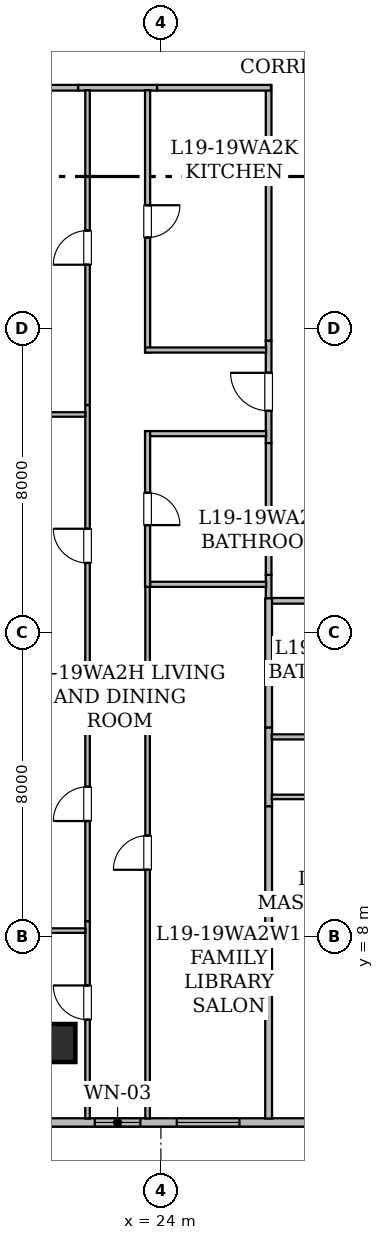
"""IFC4 building model, lengths in metres.
Left out: names, types, materials, properties, quantities, classifications, styles, units other than length and angle.
Written with IfcOpenShell. Run it as: python <this file> out.ifc"""

import sys

from ifc_helpers import new_model, si_unit, direction, frame, frame_2d, origin, origin_2d, place, context, subcontext, project, spatial, rectangle, hollow_rectangle, extrude, element, fill, save


model = new_model("IFC4")
c1 = context("Model", 3, precision=1e-05, world=origin(), true_north=direction((0.0, 1.0)))
c2 = subcontext(c1, "Body", "Model", "MODEL_VIEW")
j1 = project(units=[si_unit("LENGTHUNIT", "METRE"), si_unit("PLANEANGLEUNIT", "RADIAN")], contexts=[c1])
p1 = place(None, origin())
s1 = spatial("IfcSite", under=j1, at=p1, CompositionType="ELEMENT")
p2 = place(p1, origin())
s2 = spatial("IfcBuilding", under=s1, at=p2, CompositionType="ELEMENT")
p3 = place(p2, frame((0.0, 0.0, 77.1)))
s3 = spatial("IfcBuildingStorey", under=s2, at=p3, CompositionType="ELEMENT", Elevation=77.1)
p4 = place(p3, frame((21.25, 5.2, 0.0), z_axis=(0.0, 0.0, 1.0), x_axis=(1.0, 0.0, 0.0)))
e1 = element("IfcColumn", 1, at=p4, inside=s3, PredefinedType="COLUMN", context=c2, shape_type="SweptSolid", body=[
    extrude(hollow_rectangle(XDim=1.0, YDim=1.0, WallThickness=0.05, at=origin_2d()), origin(), (0.0, 0.0, 1.0), 3.65),
])
p5 = place(p3, frame((45.683, 3.11, 0.0), z_axis=(0.0, 0.0, 1.0), x_axis=(-1.0, 0.0, 0.0)))
e2 = element("IfcWall", 2, at=p5, inside=s3, PredefinedType="STANDARD", context=c2, shape_type="SweptSolid", body=[
    extrude(rectangle(XDim=37.368, YDim=0.22, at=frame_2d((18.684, 0.0))), origin(), (0.0, 0.0, 1.0), 3.43),
])
p6 = place(p5, frame((31.194, 0.0, 0.85)))
e3 = element("IfcOpeningElement", 3, at=p6, cuts=e2, PredefinedType="OPENING", context=c2, shape_type="SweptSolid", body=[
    extrude(rectangle(XDim=1.65, YDim=1.55, at=frame_2d((0.825, 0.775))), frame((0.0, 0.12, 0.0), z_axis=(0.0, -1.0, 0.0), x_axis=(1.0, 0.0, 0.0)), (0.0, 0.0, 1.0), 0.24),
])
p7 = place(p5, frame((19.615, 0.0, 0.85)))
e4 = element("IfcOpeningElement", 4, at=p7, cuts=e2, PredefinedType="OPENING", context=c2, shape_type="SweptSolid", body=[
    extrude(rectangle(XDim=1.65, YDim=1.55, at=frame_2d((0.825, 0.775))), frame((0.0, 0.12, 0.0), z_axis=(0.0, -1.0, 0.0), x_axis=(1.0, 0.0, 0.0)), (0.0, 0.0, 1.0), 0.24),
])
p8 = place(p5, frame((22.223, 0.0, 0.8)))
e5 = element("IfcOpeningElement", 5, at=p8, cuts=e2, PredefinedType="OPENING", context=c2, shape_type="SweptSolid", body=[
    extrude(rectangle(XDim=1.2, YDim=1.5, at=frame_2d((0.6, 0.75))), frame((0.0, 0.12, 0.0), z_axis=(0.0, -1.0, 0.0), x_axis=(1.0, 0.0, 0.0)), (0.0, 0.0, 1.0), 0.24),
])
p9 = place(p5, frame((25.65, 0.0, 0.85)))
e6 = element("IfcOpeningElement", 6, at=p9, cuts=e2, PredefinedType="OPENING", context=c2, shape_type="SweptSolid", body=[
    extrude(rectangle(XDim=1.65, YDim=1.55, at=frame_2d((0.825, 0.775))), frame((0.0, 0.12, 0.0), z_axis=(0.0, -1.0, 0.0), x_axis=(1.0, 0.0, 0.0)), (0.0, 0.0, 1.0), 0.24),
])
p10 = place(p5, frame((10.983, 0.0, 0.8)))
e7 = element("IfcOpeningElement", 7, at=p10, cuts=e2, PredefinedType="OPENING", context=c2, shape_type="SweptSolid", body=[
    extrude(rectangle(XDim=1.2, YDim=1.5, at=frame_2d((0.6, 0.75))), frame((0.0, 0.12, 0.0), z_axis=(0.0, -1.0, 0.0), x_axis=(1.0, 0.0, 0.0)), (0.0, 0.0, 1.0), 0.24),
])
p11 = place(p5, frame((14.783, 0.0, 0.85)))
e8 = element("IfcOpeningElement", 8, at=p11, cuts=e2, PredefinedType="OPENING", context=c2, shape_type="SweptSolid", body=[
    extrude(rectangle(XDim=1.65, YDim=1.55, at=frame_2d((0.825, 0.775))), frame((0.0, 0.12, 0.0), z_axis=(0.0, -1.0, 0.0), x_axis=(1.0, 0.0, 0.0)), (0.0, 0.0, 1.0), 0.24),
])
p12 = place(p5, frame((6.733, 0.0, 0.85)))
e9 = element("IfcOpeningElement", 9, at=p12, cuts=e2, PredefinedType="OPENING", context=c2, shape_type="SweptSolid", body=[
    extrude(rectangle(XDim=1.65, YDim=1.55, at=frame_2d((0.825, 0.775))), frame((0.0, 0.12, 0.0), z_axis=(0.0, -1.0, 0.0), x_axis=(1.0, 0.0, 0.0)), (0.0, 0.0, 1.0), 0.24),
])
p13 = place(p5, frame((2.228, 0.0, 0.85)))
e10 = element("IfcOpeningElement", 10, at=p13, cuts=e2, PredefinedType="OPENING", context=c2, shape_type="SweptSolid", body=[
    extrude(rectangle(XDim=1.65, YDim=1.55, at=frame_2d((0.825, 0.775))), frame((0.0, 0.12, 0.0), z_axis=(0.0, -1.0, 0.0), x_axis=(1.0, 0.0, 0.0)), (0.0, 0.0, 1.0), 0.24),
])
p14 = place(p5, frame((0.187, 0.0, 0.8)))
e11 = element("IfcOpeningElement", 11, at=p14, cuts=e2, PredefinedType="OPENING", context=c2, shape_type="SweptSolid", body=[
    extrude(rectangle(XDim=1.2, YDim=1.5, at=frame_2d((0.6, 0.75))), frame((0.0, 0.12, 0.0), z_axis=(0.0, -1.0, 0.0), x_axis=(1.0, 0.0, 0.0)), (0.0, 0.0, 1.0), 0.24),
])
p15 = place(p3, frame((26.835, 16.9, 0.0), z_axis=(0.0, 0.0, 1.0), x_axis=(0.0, 1.0, 0.0)))
e12 = element("IfcWall", 12, at=p15, inside=s3, PredefinedType="STANDARD", context=c2, shape_type="SweptSolid", body=[
    extrude(rectangle(XDim=0.618, YDim=0.15, at=frame_2d((0.309, 0.0))), origin(), (0.0, 0.0, 1.0), 3.43),
])
p16 = place(p3, frame((26.835, 20.985, 0.0), z_axis=(0.0, 0.0, 1.0), x_axis=(0.0, 1.0, 0.0)))
e13 = element("IfcWall", 13, at=p16, inside=s3, PredefinedType="STANDARD", context=c2, shape_type="SweptSolid", body=[
    extrude(rectangle(XDim=2.698, YDim=0.15, at=frame_2d((1.349, 0.0))), origin(), (0.0, 0.0, 1.0), 3.43),
])
p17 = place(p16, frame((0.849, 0.0, 0.0)))
e14 = element("IfcOpeningElement", 14, at=p17, cuts=e13, PredefinedType="OPENING", context=c2, shape_type="SweptSolid", body=[
    extrude(rectangle(XDim=1.0, YDim=2.15, at=frame_2d((0.5, 1.075))), frame((0.0, 0.085, 0.0), z_axis=(0.0, -1.0, 0.0), x_axis=(1.0, 0.0, 0.0)), (0.0, 0.0, 1.0), 0.17),
])
p18 = place(p3, frame((23.9, 30.335, 0.0), z_axis=(0.0, 0.0, 1.0), x_axis=(-1.0, 0.0, 0.0)))
e15 = element("IfcWall", 15, at=p18, inside=s3, PredefinedType="STANDARD", context=c2, shape_type="SweptSolid", body=[
    extrude(rectangle(XDim=2.079, YDim=0.15, at=frame_2d((1.04, 0.0))), origin(), (0.0, 0.0, 1.0), 3.43),
])
p19 = place(p3, frame((26.835, 17.518, 0.0), z_axis=(0.0, 0.0, 1.0), x_axis=(0.0, 1.0, 0.0)))
e16 = element("IfcWall", 16, at=p19, inside=s3, PredefinedType="STANDARD", context=c2, shape_type="SweptSolid", body=[
    extrude(rectangle(XDim=3.467, YDim=0.15, at=frame_2d((1.733, 0.0))), origin(), (0.0, 0.0, 1.0), 2.647),
])
p20 = place(p3, frame((26.835, 23.683, 0.0), z_axis=(0.0, 0.0, 1.0), x_axis=(0.0, 1.0, 0.0)))
e17 = element("IfcWall", 17, at=p20, inside=s3, PredefinedType="STANDARD", context=c2, shape_type="SweptSolid", body=[
    extrude(rectangle(XDim=6.717, YDim=0.15, at=frame_2d((3.358, 0.0))), origin(), (0.0, 0.0, 1.0), 2.961),
])
p21 = place(p3, frame((26.898, 30.335, 0.0), z_axis=(0.0, 0.0, 1.0), x_axis=(-1.0, 0.0, 0.0)))
e18 = element("IfcWall", 18, at=p21, inside=s3, PredefinedType="STANDARD", context=c2, shape_type="SweptSolid", body=[
    extrude(rectangle(XDim=2.998, YDim=0.15, at=frame_2d((1.499, 0.0))), origin(), (0.0, 0.0, 1.0), 3.43),
])
p22 = place(p3, frame((21.821, 30.335, 0.0), z_axis=(0.0, 0.0, 1.0), x_axis=(-1.0, 0.0, 0.0)))
e19 = element("IfcWall", 19, at=p22, inside=s3, PredefinedType="STANDARD", context=c2, shape_type="SweptSolid", body=[
    extrude(rectangle(XDim=5.225, YDim=0.15, at=frame_2d((2.613, 0.0))), origin(), (0.0, 0.0, 1.0), 2.647),
])
p23 = place(p3, frame((31.601, 16.835, 0.0), z_axis=(0.0, 0.0, 1.0), x_axis=(-1.0, 0.0, 0.0)))
e20 = element("IfcWall", 20, at=p23, inside=s3, PredefinedType="STANDARD", context=c2, shape_type="SweptSolid", body=[
    extrude(rectangle(XDim=4.701, YDim=0.15, at=frame_2d((2.351, 0.0))), origin(), (0.0, 0.0, 1.0), 2.647),
])
p24 = place(p3, frame((23.65, 3.212, 0.0), z_axis=(0.0, 0.0, 1.0), x_axis=(0.0, 1.0, 0.0)))
e21 = element("IfcWall", 21, at=p24, inside=s3, PredefinedType="PARTITIONING", context=c2, shape_type="SweptSolid", body=[
    extrude(rectangle(XDim=13.992, YDim=0.12, at=frame_2d((6.996, 0.0))), origin(), (0.0, 0.0, 1.0), 2.803),
])
p25 = place(p24, frame((6.546, 0.0, 0.0)))
e22 = element("IfcOpeningElement", 22, at=p25, cuts=e21, PredefinedType="OPENING", context=c2, shape_type="SweptSolid", body=[
    extrude(rectangle(XDim=0.9, YDim=2.1, at=frame_2d((0.45, 1.05))), frame((0.0, 0.07, 0.0), z_axis=(0.0, -1.0, 0.0), x_axis=(1.0, 0.0, 0.0)), (0.0, 0.0, 1.0), 0.14),
])
p26 = place(p3, frame((23.715, 17.269, 0.0), z_axis=(0.0, 0.0, 1.0), x_axis=(1.0, 0.0, 0.0)))
e23 = element("IfcWall", 23, at=p26, inside=s3, PredefinedType="PARTITIONING", context=c2, shape_type="SweptSolid", body=[
    extrude(rectangle(XDim=3.055, YDim=0.135, at=frame_2d((1.527, 0.0))), origin(), (0.0, 0.0, 1.0), 3.43),
])
p27 = place(p3, frame((26.835, 13.504, 0.0), z_axis=(0.0, 0.0, 1.0), x_axis=(0.0, -1.0, 0.0)))
e24 = element("IfcWall", 24, at=p27, inside=s3, PredefinedType="STANDARD", context=c2, shape_type="SweptSolid", body=[
    extrude(rectangle(XDim=2.078, YDim=0.18, at=frame_2d((1.039, 0.0))), origin(), (0.0, 0.0, 1.0), 3.43),
])
p28 = place(p3, frame((26.835, 16.9, 0.0), z_axis=(0.0, 0.0, 1.0), x_axis=(0.0, -1.0, 0.0)))
e25 = element("IfcWall", 25, at=p28, inside=s3, PredefinedType="STANDARD", context=c2, shape_type="SweptSolid", body=[
    extrude(rectangle(XDim=3.396, YDim=0.18, at=frame_2d((1.698, 0.0))), origin(), (0.0, 0.0, 1.0), 3.43),
])
p29 = place(p3, frame((26.835, 11.426, 0.0), z_axis=(0.0, 0.0, 1.0), x_axis=(0.0, -1.0, 0.0)))
e26 = element("IfcWall", 26, at=p29, inside=s3, PredefinedType="STANDARD", context=c2, shape_type="SweptSolid", body=[
    extrude(rectangle(XDim=8.214, YDim=0.18, at=frame_2d((4.107, 0.0))), origin(), (0.0, 0.0, 1.0), 2.803),
])
p30 = place(p3, frame((26.77, 21.234, 0.0), z_axis=(0.0, 0.0, 1.0), x_axis=(-1.0, 0.0, 0.0)))
e27 = element("IfcWall", 27, at=p30, inside=s3, PredefinedType="PARTITIONING", context=c2, shape_type="SweptSolid", body=[
    extrude(rectangle(XDim=3.185, YDim=0.135, at=frame_2d((1.593, 0.0))), origin(), (0.0, 0.0, 1.0), 3.43),
])
p31 = place(p3, frame((23.65, 21.299, 0.0), z_axis=(0.0, 0.0, 1.0), x_axis=(0.0, -1.0, 0.0)))
e28 = element("IfcWall", 28, at=p31, inside=s3, PredefinedType="PARTITIONING", context=c2, shape_type="SweptSolid", body=[
    extrude(rectangle(XDim=4.095, YDim=0.135, at=frame_2d((2.047, 0.0))), origin(), (0.0, 0.0, 1.0), 2.647),
])
p32 = place(p31, frame((1.622, 0.0, 0.0)))
e29 = element("IfcOpeningElement", 29, at=p32, cuts=e28, PredefinedType="OPENING", context=c2, shape_type="SweptSolid", body=[
    extrude(rectangle(XDim=0.85, YDim=2.1, at=frame_2d((0.425, 1.05))), frame((0.0, 0.077, 0.0), z_axis=(0.0, -1.0, 0.0), x_axis=(1.0, 0.0, 0.0)), (0.0, 0.0, 1.0), 0.155),
])
p33 = place(p3, frame((23.65, 30.27, 0.0), z_axis=(0.0, 0.0, 1.0), x_axis=(0.0, -1.0, 0.0)))
e30 = element("IfcWall", 30, at=p33, inside=s3, PredefinedType="PARTITIONING", context=c2, shape_type="SweptSolid", body=[
    extrude(rectangle(XDim=6.901, YDim=0.135, at=frame_2d((3.451, 0.0))), origin(), (0.0, 0.0, 1.0), 2.961),
])
p34 = place(p33, frame((3.026, 0.0, 0.0)))
e31 = element("IfcOpeningElement", 31, at=p34, cuts=e30, PredefinedType="OPENING", context=c2, shape_type="SweptSolid", body=[
    extrude(rectangle(XDim=0.85, YDim=2.1, at=frame_2d((0.425, 1.05))), frame((0.0, 0.077, 0.0), z_axis=(0.0, -1.0, 0.0), x_axis=(1.0, 0.0, 0.0)), (0.0, 0.0, 1.0), 0.155),
])
p35 = place(p3, frame((23.585, 23.434, 0.0), z_axis=(0.0, 0.0, 1.0), x_axis=(1.0, 0.0, 0.0)))
e32 = element("IfcWall", 32, at=p35, inside=s3, PredefinedType="PARTITIONING", context=c2, shape_type="SweptSolid", body=[
    extrude(rectangle(XDim=3.185, YDim=0.135, at=frame_2d((1.593, 0.0))), origin(), (0.0, 0.0, 1.0), 3.43),
])
p36 = place(p3, frame((22.07, 3.212, 0.0), z_axis=(0.0, 0.0, 1.0), x_axis=(0.0, 1.0, 0.0)))
e33 = element("IfcWall", 33, at=p36, inside=s3, PredefinedType="PARTITIONING", context=c2, shape_type="SweptSolid", body=[
    extrude(rectangle(XDim=5.195, YDim=0.12, at=frame_2d((2.598, 0.0))), origin(), (0.0, 0.0, 1.0), 2.803),
])
p37 = place(p36, frame((2.602, 0.0, 0.0)))
e34 = element("IfcOpeningElement", 34, at=p37, cuts=e33, PredefinedType="OPENING", context=c2, shape_type="SweptSolid", body=[
    extrude(rectangle(XDim=0.9, YDim=2.1, at=frame_2d((0.45, 1.05))), frame((0.0, 0.07, 0.0), z_axis=(0.0, -1.0, 0.0), x_axis=(1.0, 0.0, 0.0)), (0.0, 0.0, 1.0), 0.14),
])
p38 = place(p3, frame((22.07, 8.407, 0.0), z_axis=(0.0, 0.0, 1.0), x_axis=(0.0, 1.0, 0.0)))
e35 = element("IfcWall", 35, at=p38, inside=s3, PredefinedType="PARTITIONING", context=c2, shape_type="SweptSolid", body=[
    extrude(rectangle(XDim=6.21, YDim=0.12, at=frame_2d((3.105, 0.0))), origin(), (0.0, 0.0, 1.0), 3.43),
])
p39 = place(p38, frame((2.634, 0.0, 0.0)))
e36 = element("IfcOpeningElement", 36, at=p39, cuts=e35, PredefinedType="OPENING", context=c2, shape_type="SweptSolid", body=[
    extrude(rectangle(XDim=0.9, YDim=2.1, at=frame_2d((0.45, 1.05))), frame((0.0, 0.07, 0.0), z_axis=(0.0, -1.0, 0.0), x_axis=(1.0, 0.0, 0.0)), (0.0, 0.0, 1.0), 0.14),
])
p40 = place(p3, frame((22.07, 14.617, 0.0), z_axis=(0.0, 0.0, 1.0), x_axis=(0.0, 1.0, 0.0)))
e37 = element("IfcWall", 37, at=p40, inside=s3, PredefinedType="PARTITIONING", context=c2, shape_type="SweptSolid", body=[
    extrude(rectangle(XDim=7.37, YDim=0.12, at=frame_2d((3.685, 0.0))), origin(), (0.0, 0.0, 1.0), 2.647),
])
p41 = place(p40, frame((3.214, 0.0, 0.0)))
e38 = element("IfcOpeningElement", 38, at=p41, cuts=e37, PredefinedType="OPENING", context=c2, shape_type="SweptSolid", body=[
    extrude(rectangle(XDim=0.9, YDim=2.1, at=frame_2d((0.45, 1.05))), frame((0.0, 0.07, 0.0), z_axis=(0.0, -1.0, 0.0), x_axis=(1.0, 0.0, 0.0)), (0.0, 0.0, 1.0), 0.14),
])
p42 = place(p3, frame((22.07, 21.987, 0.0), z_axis=(0.0, 0.0, 1.0), x_axis=(0.0, 1.0, 0.0)))
e39 = element("IfcWall", 39, at=p42, inside=s3, PredefinedType="PARTITIONING", context=c2, shape_type="SweptSolid", body=[
    extrude(rectangle(XDim=8.283, YDim=0.12, at=frame_2d((4.142, 0.0))), origin(), (0.0, 0.0, 1.0), 2.961),
])
p43 = place(p42, frame((3.691, 0.0, 0.0)))
e40 = element("IfcOpeningElement", 40, at=p43, cuts=e39, PredefinedType="OPENING", context=c2, shape_type="SweptSolid", body=[
    extrude(rectangle(XDim=0.9, YDim=2.1, at=frame_2d((0.45, 1.05))), frame((0.0, 0.07, 0.0), z_axis=(0.0, -1.0, 0.0), x_axis=(1.0, 0.0, 0.0)), (0.0, 0.0, 1.0), 0.14),
])
for number, where, z_axis, x_axis in (
    (41, (16.428, 8.158, 0.0), (0.0, 0.0, 1.0), (1.0, 0.0, 0.0)),
    (42, (16.428, 14.368, 0.0), (0.0, 0.0, 1.0), (1.0, 0.0, 0.0)),
    (43, (16.428, 21.738, 0.0), (0.0, 0.0, 1.0), (1.0, 0.0, 0.0)),
):
    element("IfcWall", number, at=place(p3, frame(where, z_axis=z_axis, x_axis=x_axis)), inside=s3, PredefinedType="PARTITIONING", context=c2, shape_type="SweptSolid", body=[
        extrude(rectangle(XDim=5.588, YDim=0.12, at=frame_2d((2.794, 0.0))), origin(), (0.0, 0.0, 1.0), 2.647),
    ])
p44 = place(p3, frame((26.917, 13.255, 0.0), z_axis=(0.0, 0.0, 1.0), x_axis=(1.0, 0.0, 0.0)))
e44 = element("IfcWall", 44, at=p44, inside=s3, PredefinedType="PARTITIONING", context=c2, shape_type="SweptSolid", body=[
    extrude(rectangle(XDim=4.998, YDim=0.135, at=frame_2d((2.499, 0.0))), origin(), (0.0, 0.0, 1.0), 2.647),
])
p45 = place(p44, frame((2.074, 0.0, 0.0)))
e45 = element("IfcOpeningElement", 45, at=p45, cuts=e44, PredefinedType="OPENING", context=c2, shape_type="SweptSolid", body=[
    extrude(rectangle(XDim=0.85, YDim=2.1, at=frame_2d((0.425, 1.05))), frame((0.0, 0.077, 0.0), z_axis=(0.0, -1.0, 0.0), x_axis=(1.0, 0.0, 0.0)), (0.0, 0.0, 1.0), 0.155),
])
p46 = place(p3, frame((33.38, 11.675, 0.0), z_axis=(0.0, 0.0, 1.0), x_axis=(-1.0, 0.0, 0.0)))
e46 = element("IfcWall", 46, at=p46, inside=s3, PredefinedType="PARTITIONING", context=c2, shape_type="SweptSolid", body=[
    extrude(rectangle(XDim=6.463, YDim=0.12, at=frame_2d((3.231, 0.0))), origin(), (0.0, 0.0, 1.0), 2.647),
])
p47 = place(p7, origin())
e47 = element("IfcWindow", 47, at=p47, inside=s3, PartitioningType="SINGLE_PANEL", PredefinedType="WINDOW", context=c2, shape_type="SweptSolid", body=[
    extrude(rectangle(XDim=1.65, YDim=1.55, at=frame_2d((0.825, 0.775))), frame((0.0, 0.03, 0.0), z_axis=(0.0, -1.0, 0.0), x_axis=(1.0, 0.0, 0.0)), (0.0, 0.0, 1.0), 0.06),
])
fill(e4, e47)
p48 = place(p8, origin())
e48 = element("IfcWindow", 48, at=p48, inside=s3, PartitioningType="SINGLE_PANEL", PredefinedType="WINDOW", context=c2, shape_type="SweptSolid", body=[
    extrude(rectangle(XDim=1.2, YDim=1.5, at=frame_2d((0.6, 0.75))), frame((0.0, 0.03, 0.0), z_axis=(0.0, -1.0, 0.0), x_axis=(1.0, 0.0, 0.0)), (0.0, 0.0, 1.0), 0.06),
])
fill(e5, e48)
p49 = place(p17, origin())
e49 = element("IfcDoor", 49, at=p49, inside=s3, OperationType="SINGLE_SWING_RIGHT", PredefinedType="DOOR", context=c2, shape_type="SweptSolid", body=[
    extrude(rectangle(XDim=1.0, YDim=2.15, at=frame_2d((0.5, 1.075))), frame((0.0, 0.025, 0.0), z_axis=(0.0, -1.0, 0.0), x_axis=(1.0, 0.0, 0.0)), (0.0, 0.0, 1.0), 0.05),
])
fill(e14, e49)
p50 = place(p25, origin())
e50 = element("IfcDoor", 50, at=p50, inside=s3, OperationType="SINGLE_SWING_LEFT", PredefinedType="DOOR", context=c2, shape_type="SweptSolid", body=[
    extrude(rectangle(XDim=0.9, YDim=2.1, at=frame_2d((0.45, 1.05))), frame((0.0, 0.025, 0.0), z_axis=(0.0, -1.0, 0.0), x_axis=(1.0, 0.0, 0.0)), (0.0, 0.0, 1.0), 0.05),
])
fill(e22, e50)
p51 = place(p32, origin())
e51 = element("IfcDoor", 51, at=p51, inside=s3, OperationType="SINGLE_SWING_RIGHT", PredefinedType="DOOR", context=c2, shape_type="SweptSolid", body=[
    extrude(rectangle(XDim=0.85, YDim=2.1, at=frame_2d((0.425, 1.05))), frame((0.0, 0.025, 0.0), z_axis=(0.0, -1.0, 0.0), x_axis=(1.0, 0.0, 0.0)), (0.0, 0.0, 1.0), 0.05),
])
fill(e29, e51)
p52 = place(p34, origin())
e52 = element("IfcDoor", 52, at=p52, inside=s3, OperationType="SINGLE_SWING_LEFT", PredefinedType="DOOR", context=c2, shape_type="SweptSolid", body=[
    extrude(rectangle(XDim=0.85, YDim=2.1, at=frame_2d((0.425, 1.05))), frame((0.0, 0.025, 0.0), z_axis=(0.0, -1.0, 0.0), x_axis=(1.0, 0.0, 0.0)), (0.0, 0.0, 1.0), 0.05),
])
fill(e31, e52)
p53 = place(p37, origin())
e53 = element("IfcDoor", 53, at=p53, inside=s3, OperationType="SINGLE_SWING_RIGHT", PredefinedType="DOOR", context=c2, shape_type="SweptSolid", body=[
    extrude(rectangle(XDim=0.9, YDim=2.1, at=frame_2d((0.45, 1.05))), frame((0.0, 0.025, 0.0), z_axis=(0.0, -1.0, 0.0), x_axis=(1.0, 0.0, 0.0)), (0.0, 0.0, 1.0), 0.05),
])
fill(e34, e53)
p54 = place(p39, origin())
e54 = element("IfcDoor", 54, at=p54, inside=s3, OperationType="SINGLE_SWING_LEFT", PredefinedType="DOOR", context=c2, shape_type="SweptSolid", body=[
    extrude(rectangle(XDim=0.9, YDim=2.1, at=frame_2d((0.45, 1.05))), frame((0.0, 0.025, 0.0), z_axis=(0.0, -1.0, 0.0), x_axis=(1.0, 0.0, 0.0)), (0.0, 0.0, 1.0), 0.05),
])
fill(e36, e54)
p55 = place(p41, origin())
e55 = element("IfcDoor", 55, at=p55, inside=s3, OperationType="SINGLE_SWING_RIGHT", PredefinedType="DOOR", context=c2, shape_type="SweptSolid", body=[
    extrude(rectangle(XDim=0.9, YDim=2.1, at=frame_2d((0.45, 1.05))), frame((0.0, 0.025, 0.0), z_axis=(0.0, -1.0, 0.0), x_axis=(1.0, 0.0, 0.0)), (0.0, 0.0, 1.0), 0.05),
])
fill(e38, e55)
p56 = place(p43, origin())
e56 = element("IfcDoor", 56, at=p56, inside=s3, OperationType="SINGLE_SWING_LEFT", PredefinedType="DOOR", context=c2, shape_type="SweptSolid", body=[
    extrude(rectangle(XDim=0.9, YDim=2.1, at=frame_2d((0.45, 1.05))), frame((0.0, 0.025, 0.0), z_axis=(0.0, -1.0, 0.0), x_axis=(1.0, 0.0, 0.0)), (0.0, 0.0, 1.0), 0.05),
])
fill(e40, e56)
save(model, sys.argv[1])
